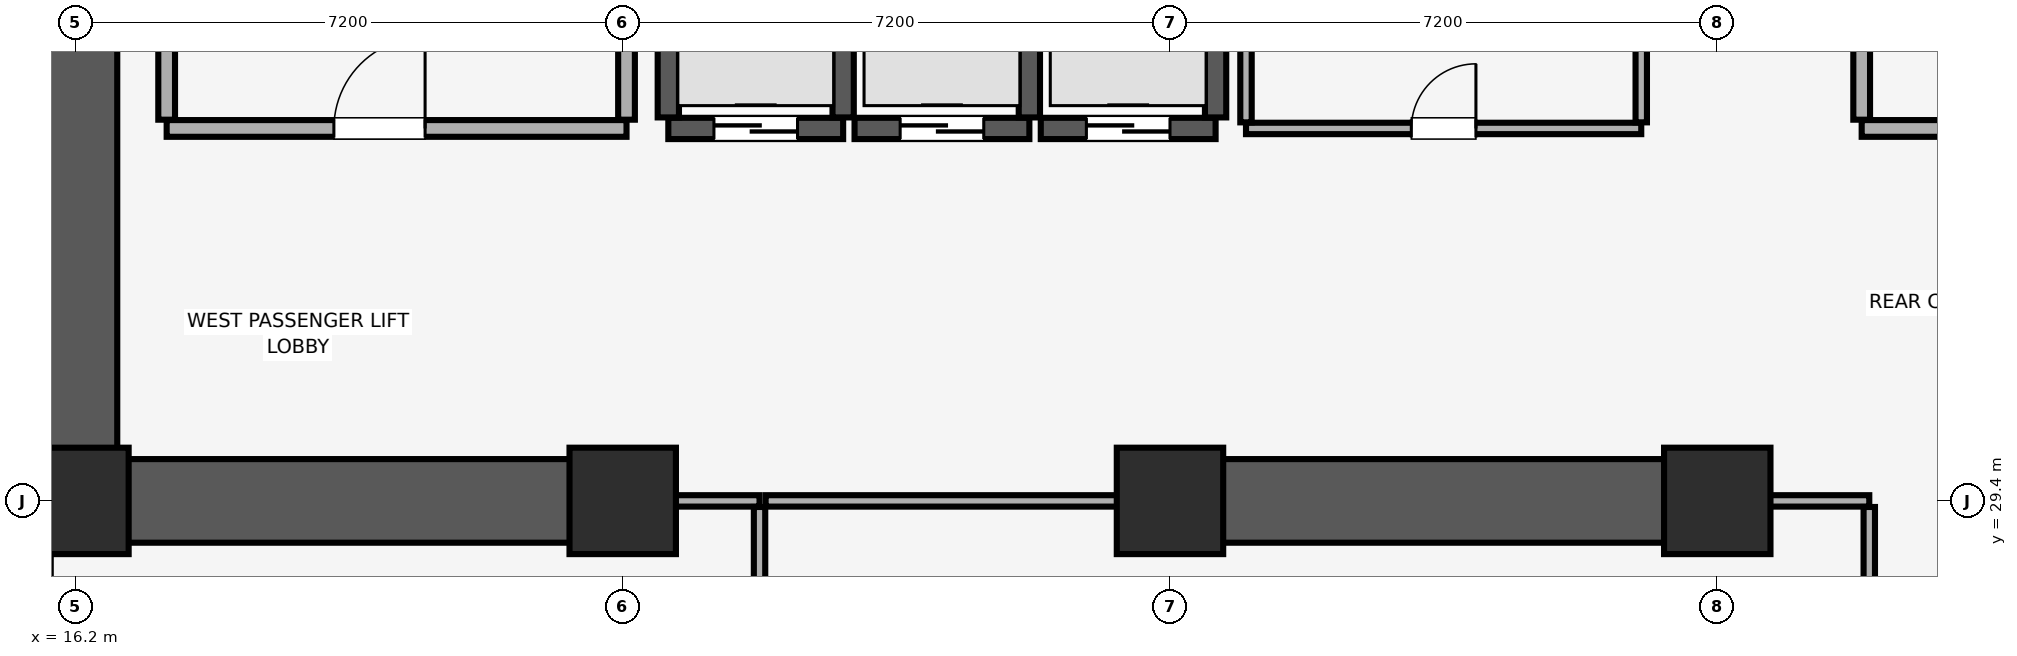
"""IFC4 building model, lengths in metres.
Left out: names, types, materials, properties, quantities, classifications, styles, units other than length and angle.
Written with IfcOpenShell. Run it as: python <this file> out.ifc"""

import sys

from ifc_helpers import new_model, si_unit, direction, frame, frame_2d, origin, origin_2d, place, context, subcontext, project, spatial, rectangle, extrude, element, fill, save


model = new_model("IFC4")
c1 = context("Model", 3, precision=1e-05, world=origin(), true_north=direction((0.0, 1.0)))
c2 = subcontext(c1, "Body", "Model", "MODEL_VIEW")
j1 = project(units=[si_unit("LENGTHUNIT", "METRE"), si_unit("PLANEANGLEUNIT", "RADIAN")], contexts=[c1])
p1 = place(None, origin())
s1 = spatial("IfcSite", under=j1, at=p1, CompositionType="ELEMENT")
p2 = place(p1, origin())
s2 = spatial("IfcBuilding", under=s1, at=p2, CompositionType="ELEMENT")
p3 = place(p2, frame((0.0, 0.0, 76.4)))
s3 = spatial("IfcBuildingStorey", under=s2, at=p3, CompositionType="ELEMENT", Elevation=76.4)
for number, where, z_axis, x_axis in (
    (1, (16.2, 29.4, 0.0), (0.0, 0.0, 1.0), (1.0, 0.0, 0.0)),
    (2, (23.4, 29.4, 0.0), (0.0, 0.0, 1.0), (1.0, 0.0, 0.0)),
    (3, (30.6, 29.4, 0.0), (0.0, 0.0, 1.0), (1.0, 0.0, 0.0)),
    (4, (37.8, 29.4, 0.0), (0.0, 0.0, 1.0), (1.0, 0.0, 0.0)),
):
    element("IfcColumn", number, at=place(p3, frame(where, z_axis=z_axis, x_axis=x_axis)), inside=s3, PredefinedType="COLUMN", context=c2, shape_type="SweptSolid", body=[
        extrude(rectangle(XDim=1.4, YDim=1.4, at=origin_2d()), origin(), (0.0, 0.0, 1.0), 3.4),
    ])
p4 = place(p3, frame((16.2, 29.4, 0.0), z_axis=(0.0, 0.0, 1.0), x_axis=(0.0, 1.0, 0.0)))
e5 = element("IfcWall", 5, at=p4, inside=s3, PredefinedType="SHEAR", context=c2, shape_type="SweptSolid", body=[
    extrude(rectangle(XDim=19.2, YDim=1.1, at=frame_2d((9.6, 0.0))), origin(), (0.0, 0.0, 1.0), 3.4),
])
p5 = place(p3, frame((16.755, 29.4, 0.0), z_axis=(0.0, 0.0, 1.0), x_axis=(1.0, 0.0, 0.0)))
e6 = element("IfcWall", 6, at=p5, inside=s3, PredefinedType="SHEAR", context=c2, shape_type="SweptSolid", body=[
    extrude(rectangle(XDim=6.845, YDim=1.1, at=frame_2d((3.423, 0.0))), origin(), (0.0, 0.0, 1.0), 3.4),
])
p6 = place(p3, frame((30.4, 29.4, 0.0), z_axis=(0.0, 0.0, 1.0), x_axis=(1.0, 0.0, 0.0)))
e7 = element("IfcWall", 7, at=p6, inside=s3, PredefinedType="SHEAR", context=c2, shape_type="SweptSolid", body=[
    extrude(rectangle(XDim=7.6, YDim=1.1, at=frame_2d((3.8, 0.0))), origin(), (0.0, 0.0, 1.0), 3.4),
])
p7 = place(p3, frame((24.0, 34.3, 0.0), z_axis=(0.0, 0.0, 1.0), x_axis=(1.0, 0.0, 0.0)))
e8 = element("IfcWall", 8, at=p7, inside=s3, PredefinedType="SHEAR", context=c2, shape_type="SweptSolid", body=[
    extrude(rectangle(XDim=2.3, YDim=0.28, at=frame_2d((1.15, 0.0))), origin(), (0.0, 0.0, 1.0), 3.4),
])
p8 = place(p7, frame((0.6, 0.0, 0.0)))
e9 = element("IfcOpeningElement", 9, at=p8, cuts=e8, PredefinedType="OPENING", context=c2, shape_type="SweptSolid", body=[
    extrude(rectangle(XDim=1.1, YDim=2.2, at=frame_2d((0.55, 1.1))), frame((0.0, 0.15, 0.0), z_axis=(0.0, -1.0, 0.0), x_axis=(1.0, 0.0, 0.0)), (0.0, 0.0, 1.0), 0.3),
])
for number, where, z_axis, x_axis in (
    (10, (24.0, 34.445, 0.0), (0.0, 0.0, 1.0), (0.0, 1.0, 0.0)),
    (11, (26.3, 34.445, 0.0), (0.0, 0.0, 1.0), (0.0, 1.0, 0.0)),
):
    element("IfcWall", number, at=place(p3, frame(where, z_axis=z_axis, x_axis=x_axis)), inside=s3, PredefinedType="SHEAR", context=c2, shape_type="SweptSolid", body=[
        extrude(rectangle(XDim=2.01, YDim=0.28, at=frame_2d((1.005, 0.0))), origin(), (0.0, 0.0, 1.0), 3.4),
    ])
p9 = place(p3, frame((26.45, 34.3, 0.0), z_axis=(0.0, 0.0, 1.0), x_axis=(1.0, 0.0, 0.0)))
e12 = element("IfcWall", 12, at=p9, inside=s3, PredefinedType="SHEAR", context=c2, shape_type="SweptSolid", body=[
    extrude(rectangle(XDim=2.3, YDim=0.28, at=frame_2d((1.15, 0.0))), origin(), (0.0, 0.0, 1.0), 3.4),
])
p10 = place(p9, frame((0.6, 0.0, 0.0)))
e13 = element("IfcOpeningElement", 13, at=p10, cuts=e12, PredefinedType="OPENING", context=c2, shape_type="SweptSolid", body=[
    extrude(rectangle(XDim=1.1, YDim=2.2, at=frame_2d((0.55, 1.1))), frame((0.0, 0.15, 0.0), z_axis=(0.0, -1.0, 0.0), x_axis=(1.0, 0.0, 0.0)), (0.0, 0.0, 1.0), 0.3),
])
p11 = place(p3, frame((28.75, 34.445, 0.0), z_axis=(0.0, 0.0, 1.0), x_axis=(0.0, 1.0, 0.0)))
e14 = element("IfcWall", 14, at=p11, inside=s3, PredefinedType="SHEAR", context=c2, shape_type="SweptSolid", body=[
    extrude(rectangle(XDim=2.01, YDim=0.28, at=frame_2d((1.005, 0.0))), origin(), (0.0, 0.0, 1.0), 3.4),
])
p12 = place(p3, frame((28.9, 34.3, 0.0), z_axis=(0.0, 0.0, 1.0), x_axis=(1.0, 0.0, 0.0)))
e15 = element("IfcWall", 15, at=p12, inside=s3, PredefinedType="SHEAR", context=c2, shape_type="SweptSolid", body=[
    extrude(rectangle(XDim=2.3, YDim=0.28, at=frame_2d((1.15, 0.0))), origin(), (0.0, 0.0, 1.0), 3.4),
])
p13 = place(p12, frame((0.6, 0.0, 0.0)))
e16 = element("IfcOpeningElement", 16, at=p13, cuts=e15, PredefinedType="OPENING", context=c2, shape_type="SweptSolid", body=[
    extrude(rectangle(XDim=1.1, YDim=2.2, at=frame_2d((0.55, 1.1))), frame((0.0, 0.15, 0.0), z_axis=(0.0, -1.0, 0.0), x_axis=(1.0, 0.0, 0.0)), (0.0, 0.0, 1.0), 0.3),
])
p14 = place(p3, frame((31.2, 34.445, 0.0), z_axis=(0.0, 0.0, 1.0), x_axis=(0.0, 1.0, 0.0)))
e17 = element("IfcWall", 17, at=p14, inside=s3, PredefinedType="SHEAR", context=c2, shape_type="SweptSolid", body=[
    extrude(rectangle(XDim=2.01, YDim=0.28, at=frame_2d((1.005, 0.0))), origin(), (0.0, 0.0, 1.0), 3.4),
])
p15 = place(p3, frame((17.4, 34.3, 0.0), z_axis=(0.0, 0.0, 1.0), x_axis=(1.0, 0.0, 0.0)))
e18 = element("IfcWall", 18, at=p15, inside=s3, PredefinedType="PARTITIONING", context=c2, shape_type="SweptSolid", body=[
    extrude(rectangle(XDim=6.05, YDim=0.22, at=frame_2d((3.025, 0.0))), origin(), (0.0, 0.0, 1.0), 3.4),
])
p16 = place(p15, frame((2.2, 0.0, 0.0)))
e19 = element("IfcOpeningElement", 19, at=p16, cuts=e18, PredefinedType="OPENING", context=c2, shape_type="SweptSolid", body=[
    extrude(rectangle(XDim=1.2, YDim=2.15, at=frame_2d((0.6, 1.075))), frame((0.0, 0.12, 0.0), z_axis=(0.0, -1.0, 0.0), x_axis=(1.0, 0.0, 0.0)), (0.0, 0.0, 1.0), 0.24),
])
p17 = place(p3, frame((17.4, 34.415, 0.0), z_axis=(0.0, 0.0, 1.0), x_axis=(0.0, 1.0, 0.0)))
e20 = element("IfcWall", 20, at=p17, inside=s3, PredefinedType="PARTITIONING", context=c2, shape_type="SweptSolid", body=[
    extrude(rectangle(XDim=5.43, YDim=0.22, at=frame_2d((2.715, 0.0))), origin(), (0.0, 0.0, 1.0), 3.4),
])
p18 = place(p3, frame((23.45, 34.415, 0.0), z_axis=(0.0, 0.0, 1.0), x_axis=(0.0, 1.0, 0.0)))
e21 = element("IfcWall", 21, at=p18, inside=s3, PredefinedType="PARTITIONING", context=c2, shape_type="SweptSolid", body=[
    extrude(rectangle(XDim=5.64, YDim=0.22, at=frame_2d((2.82, 0.0))), origin(), (0.0, 0.0, 1.0), 3.4),
])
p19 = place(p3, frame((39.7, 34.3, 0.0), z_axis=(0.0, 0.0, 1.0), x_axis=(1.0, 0.0, 0.0)))
e22 = element("IfcWall", 22, at=p19, inside=s3, PredefinedType="PARTITIONING", context=c2, shape_type="SweptSolid", body=[
    extrude(rectangle(XDim=4.6, YDim=0.22, at=frame_2d((2.3, 0.0))), origin(), (0.0, 0.0, 1.0), 3.4),
])
p20 = place(p19, frame((1.7, 0.0, 0.0)))
e23 = element("IfcOpeningElement", 23, at=p20, cuts=e22, PredefinedType="OPENING", context=c2, shape_type="SweptSolid", body=[
    extrude(rectangle(XDim=1.2, YDim=2.15, at=frame_2d((0.6, 1.075))), frame((0.0, 0.12, 0.0), z_axis=(0.0, -1.0, 0.0), x_axis=(1.0, 0.0, 0.0)), (0.0, 0.0, 1.0), 0.24),
])
p21 = place(p3, frame((39.7, 34.415, 0.0), z_axis=(0.0, 0.0, 1.0), x_axis=(0.0, 1.0, 0.0)))
e24 = element("IfcWall", 24, at=p21, inside=s3, PredefinedType="PARTITIONING", context=c2, shape_type="SweptSolid", body=[
    extrude(rectangle(XDim=5.785, YDim=0.22, at=frame_2d((2.893, 0.0))), origin(), (0.0, 0.0, 1.0), 3.4),
])
p22 = place(p3, frame((31.6, 34.3, 0.0), z_axis=(0.0, 0.0, 1.0), x_axis=(1.0, 0.0, 0.0)))
e25 = element("IfcWall", 25, at=p22, inside=s3, PredefinedType="PARTITIONING", context=c2, shape_type="SweptSolid", body=[
    extrude(rectangle(XDim=5.2, YDim=0.15, at=frame_2d((2.6, 0.0))), origin(), (0.0, 0.0, 1.0), 3.4),
])
p23 = place(p22, frame((2.175, 0.0, 0.0)))
e26 = element("IfcOpeningElement", 26, at=p23, cuts=e25, PredefinedType="OPENING", context=c2, shape_type="SweptSolid", body=[
    extrude(rectangle(XDim=0.85, YDim=2.1, at=frame_2d((0.425, 1.05))), frame((0.0, 0.085, 0.0), z_axis=(0.0, -1.0, 0.0), x_axis=(1.0, 0.0, 0.0)), (0.0, 0.0, 1.0), 0.17),
])
for number, where, z_axis, x_axis in (
    (27, (31.6, 34.38, 0.0), (0.0, 0.0, 1.0), (0.0, 1.0, 0.0)),
    (28, (36.8, 34.38, 0.0), (0.0, 0.0, 1.0), (0.0, 1.0, 0.0)),
):
    element("IfcWall", number, at=place(p3, frame(where, z_axis=z_axis, x_axis=x_axis)), inside=s3, PredefinedType="PARTITIONING", context=c2, shape_type="SweptSolid", body=[
        extrude(rectangle(XDim=4.94, YDim=0.15, at=frame_2d((2.47, 0.0))), origin(), (0.0, 0.0, 1.0), 3.4),
    ])
p24 = place(p3, frame((23.61, 29.4, 0.0), z_axis=(0.0, 0.0, 1.0), x_axis=(1.0, 0.0, 0.0)))
e29 = element("IfcWall", 29, at=p24, inside=s3, PredefinedType="PARTITIONING", context=c2, shape_type="SweptSolid", body=[
    extrude(rectangle(XDim=1.59, YDim=0.15, at=frame_2d((0.795, 0.0))), origin(), (0.0, 0.0, 1.0), 2.3),
])
p25 = place(p3, frame((25.2, 21.13, 0.0), z_axis=(0.0, 0.0, 1.0), x_axis=(0.0, 1.0, 0.0)))
e30 = element("IfcWall", 30, at=p25, inside=s3, PredefinedType="PARTITIONING", context=c2, shape_type="SweptSolid", body=[
    extrude(rectangle(XDim=8.19, YDim=0.15, at=frame_2d((4.095, 0.0))), origin(), (0.0, 0.0, 1.0), 3.4),
])
p26 = place(p3, frame((25.28, 29.4, 0.0), z_axis=(0.0, 0.0, 1.0), x_axis=(1.0, 0.0, 0.0)))
e31 = element("IfcWall", 31, at=p26, inside=s3, PredefinedType="PARTITIONING", context=c2, shape_type="SweptSolid", body=[
    extrude(rectangle(XDim=5.11, YDim=0.15, at=frame_2d((2.555, 0.0))), origin(), (0.0, 0.0, 1.0), 2.3),
])
p27 = place(p3, frame((38.01, 29.4, 0.0), z_axis=(0.0, 0.0, 1.0), x_axis=(1.0, 0.0, 0.0)))
e32 = element("IfcWall", 32, at=p27, inside=s3, PredefinedType="PARTITIONING", context=c2, shape_type="SweptSolid", body=[
    extrude(rectangle(XDim=1.79, YDim=0.15, at=frame_2d((0.895, 0.0))), origin(), (0.0, 0.0, 1.0), 2.3),
])
p28 = place(p3, frame((39.8, 21.13, 0.0), z_axis=(0.0, 0.0, 1.0), x_axis=(0.0, 1.0, 0.0)))
e33 = element("IfcWall", 33, at=p28, inside=s3, PredefinedType="PARTITIONING", context=c2, shape_type="SweptSolid", body=[
    extrude(rectangle(XDim=8.19, YDim=0.15, at=frame_2d((4.095, 0.0))), origin(), (0.0, 0.0, 1.0), 3.4),
])
p29 = place(p8, origin())
e34 = element("IfcDoor", 34, at=p29, inside=s3, OperationType="DOUBLE_DOOR_SLIDING", PredefinedType="DOOR", context=c2, shape_type="SweptSolid", body=[
    extrude(rectangle(XDim=1.1, YDim=2.2, at=frame_2d((0.55, 1.1))), frame((0.0, 0.025, 0.0), z_axis=(0.0, -1.0, 0.0), x_axis=(1.0, 0.0, 0.0)), (0.0, 0.0, 1.0), 0.05),
])
fill(e9, e34)
p30 = place(p10, origin())
e35 = element("IfcDoor", 35, at=p30, inside=s3, OperationType="DOUBLE_DOOR_SLIDING", PredefinedType="DOOR", context=c2, shape_type="SweptSolid", body=[
    extrude(rectangle(XDim=1.1, YDim=2.2, at=frame_2d((0.55, 1.1))), frame((0.0, 0.025, 0.0), z_axis=(0.0, -1.0, 0.0), x_axis=(1.0, 0.0, 0.0)), (0.0, 0.0, 1.0), 0.05),
])
fill(e13, e35)
p31 = place(p13, origin())
e36 = element("IfcDoor", 36, at=p31, inside=s3, OperationType="DOUBLE_DOOR_SLIDING", PredefinedType="DOOR", context=c2, shape_type="SweptSolid", body=[
    extrude(rectangle(XDim=1.1, YDim=2.2, at=frame_2d((0.55, 1.1))), frame((0.0, 0.025, 0.0), z_axis=(0.0, -1.0, 0.0), x_axis=(1.0, 0.0, 0.0)), (0.0, 0.0, 1.0), 0.05),
])
fill(e16, e36)
p32 = place(p16, origin())
e37 = element("IfcDoor", 37, at=p32, inside=s3, OperationType="SINGLE_SWING_RIGHT", PredefinedType="DOOR", context=c2, shape_type="SweptSolid", body=[
    extrude(rectangle(XDim=1.2, YDim=2.15, at=frame_2d((0.6, 1.075))), frame((0.0, 0.025, 0.0), z_axis=(0.0, -1.0, 0.0), x_axis=(1.0, 0.0, 0.0)), (0.0, 0.0, 1.0), 0.05),
])
fill(e19, e37)
p33 = place(p23, origin())
e38 = element("IfcDoor", 38, at=p33, inside=s3, OperationType="SINGLE_SWING_RIGHT", PredefinedType="DOOR", context=c2, shape_type="SweptSolid", body=[
    extrude(rectangle(XDim=0.85, YDim=2.1, at=frame_2d((0.425, 1.05))), frame((0.0, 0.025, 0.0), z_axis=(0.0, -1.0, 0.0), x_axis=(1.0, 0.0, 0.0)), (0.0, 0.0, 1.0), 0.05),
])
fill(e26, e38)
save(model, sys.argv[1])
